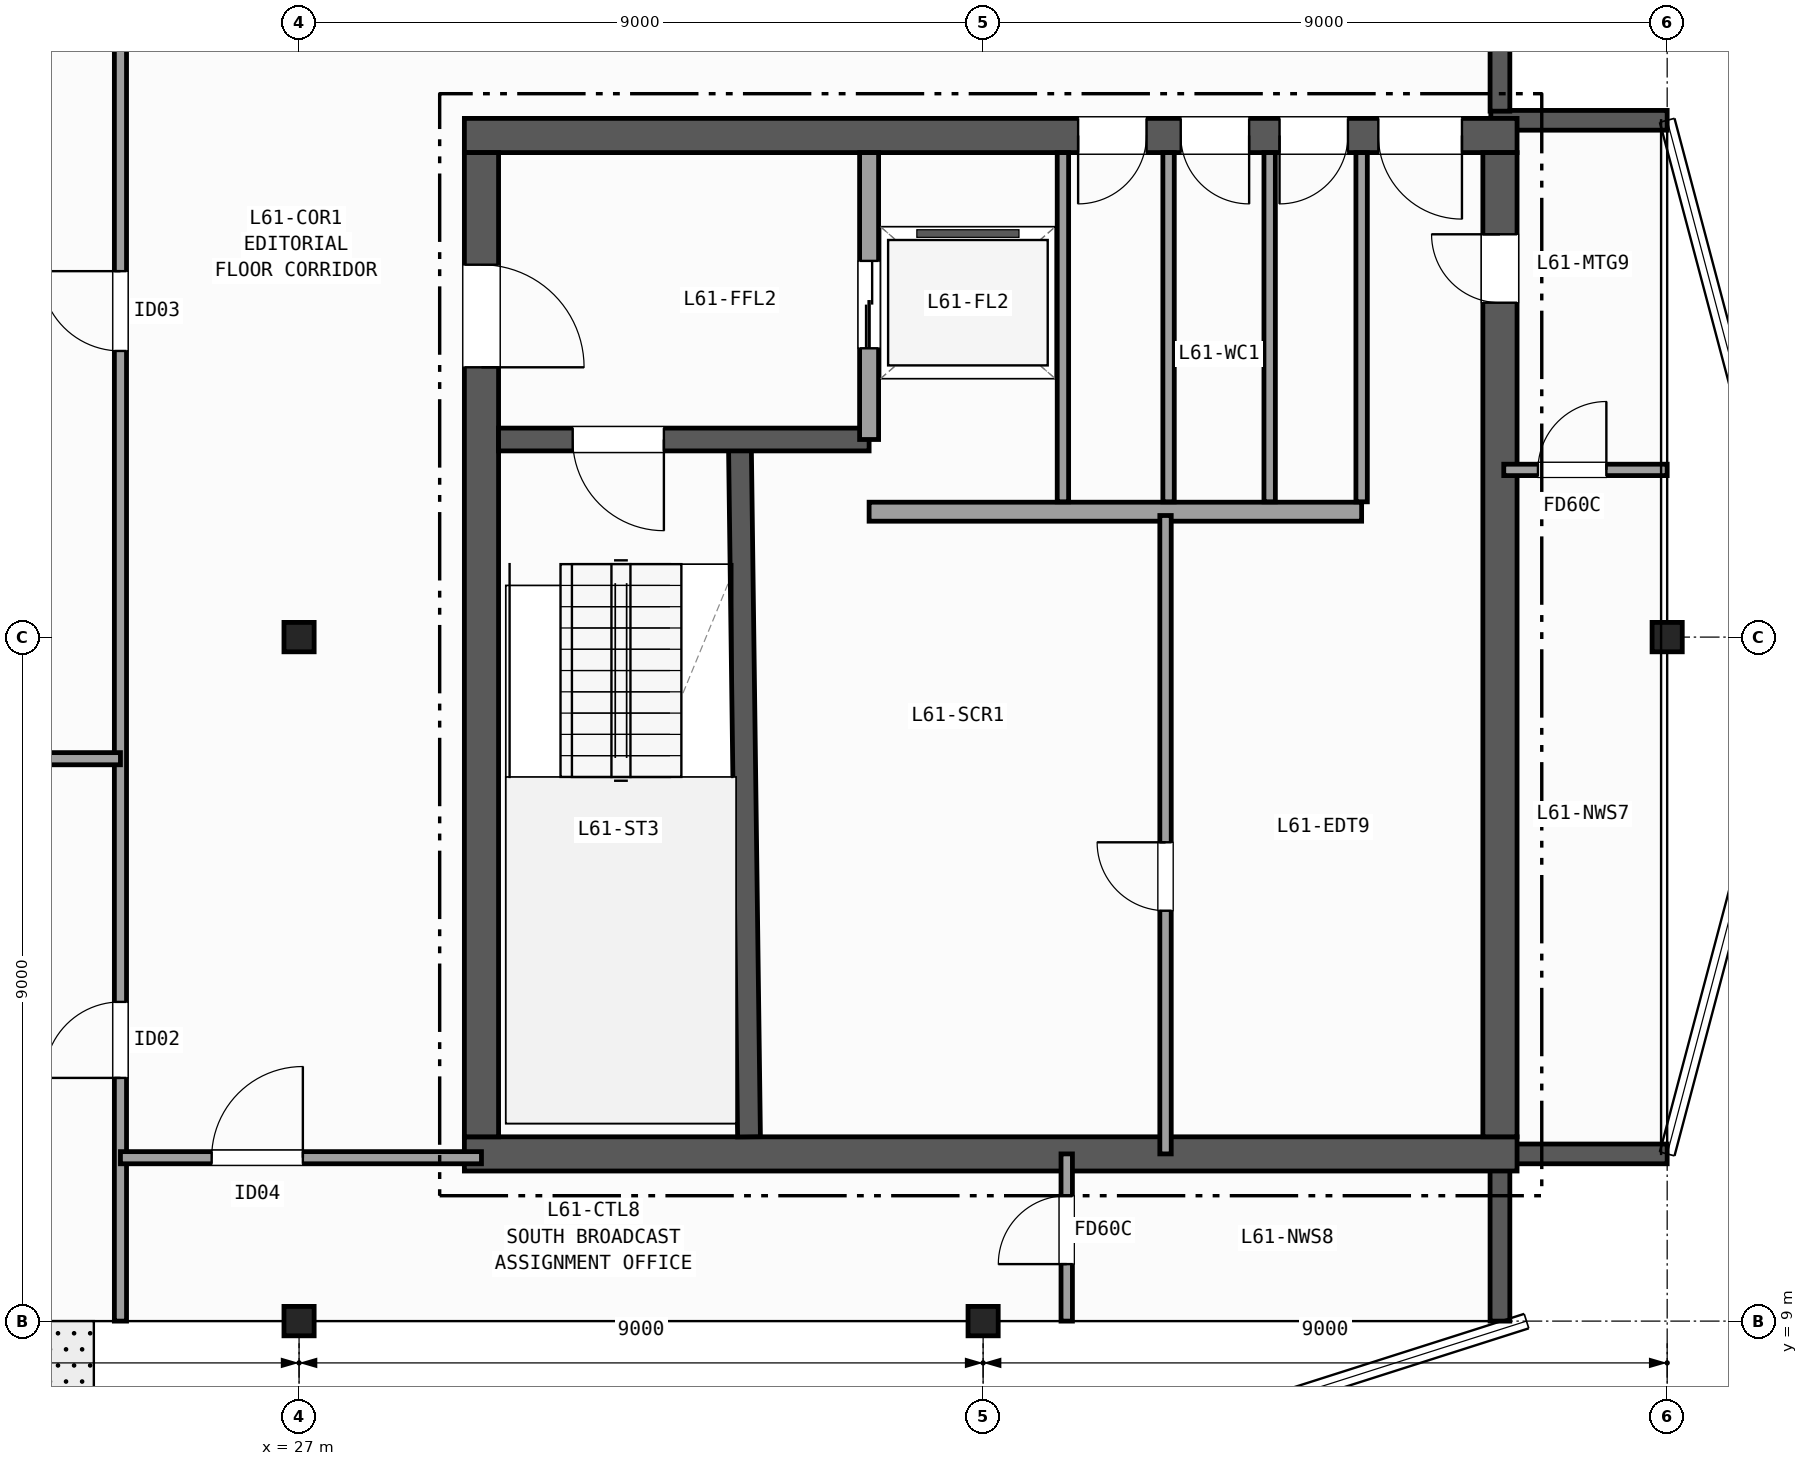
"""IFC4 building model, lengths in metres.
Left out: names, types, materials, properties, quantities, classifications, styles, units other than length and angle.
Written with IfcOpenShell. Run it as: python <this file> out.ifc"""

import sys

from ifc_helpers import new_model, si_unit, direction, frame, frame_2d, origin, origin_2d, place, context, subcontext, project, spatial, rectangle, i_section, extrude, element, fill, save


model = new_model("IFC4")
c1 = context("Model", 3, precision=1e-05, world=origin(), true_north=direction((0.0, 1.0)))
c2 = subcontext(c1, "Body", "Model", "MODEL_VIEW")
j1 = project(units=[si_unit("LENGTHUNIT", "METRE"), si_unit("PLANEANGLEUNIT", "RADIAN")], contexts=[c1])
p1 = place(None, origin())
s1 = spatial("IfcSite", under=j1, at=p1, CompositionType="ELEMENT")
p2 = place(p1, origin())
s2 = spatial("IfcBuilding", under=s1, at=p2, CompositionType="ELEMENT")
p3 = place(p2, frame((0.0, 0.0, 244.5)))
s3 = spatial("IfcBuildingStorey", under=s2, at=p3, CompositionType="ELEMENT", Elevation=244.5)
for number, where, z_axis, x_axis in (
    (1, (27.0, 9.0, 0.0), (0.0, 0.0, 1.0), (1.0, 0.0, 0.0)),
    (2, (27.0, 18.0, 0.0), (0.0, 0.0, 1.0), (1.0, 0.0, 0.0)),
    (3, (36.0, 9.0, 0.0), (0.0, 0.0, 1.0), (1.0, 0.0, 0.0)),
    (4, (45.0, 18.0, 0.0), (0.0, 0.0, 1.0), (1.0, 0.0, 0.0)),
):
    element("IfcColumn", number, at=place(p3, frame(where, z_axis=z_axis, x_axis=x_axis)), inside=s3, PredefinedType="COLUMN", context=c2, shape_type="SweptSolid", body=[
        extrude(i_section(OverallWidth=0.397, OverallDepth=0.387, WebThickness=0.021, FlangeThickness=0.033, FilletRadius=0.015, at=origin_2d()), origin(), (0.0, 0.0, 1.0), 3.7),
    ])
p4 = place(p3, frame((42.8, 9.0, 0.0), z_axis=(0.0, 0.0, 1.0), x_axis=(0.0, 1.0, 0.0)))
e5 = element("IfcWall", 5, at=p4, inside=s3, PredefinedType="SOLIDWALL", context=c2, shape_type="SweptSolid", body=[
    extrude(rectangle(XDim=2.08, YDim=0.26, at=frame_2d((1.04, 0.0))), origin(), (0.0, 0.0, 1.0), 3.42),
])
for number, where, z_axis, x_axis in (
    (6, (42.68, 11.2, 0.0), (0.0, 0.0, 1.0), (1.0, 0.0, 0.0)),
    (7, (45.0, 24.8, 0.0), (0.0, 0.0, 1.0), (-1.0, 0.0, 0.0)),
):
    element("IfcWall", number, at=place(p3, frame(where, z_axis=z_axis, x_axis=x_axis)), inside=s3, PredefinedType="SOLIDWALL", context=c2, shape_type="SweptSolid", body=[
        extrude(rectangle(XDim=2.32, YDim=0.26, at=frame_2d((1.16, 0.0))), origin(), (0.0, 0.0, 1.0), 3.42),
    ])
p5 = place(p3, frame((42.8, 24.92, 0.0), z_axis=(0.0, 0.0, 1.0), x_axis=(0.0, 1.0, 0.0)))
e8 = element("IfcWall", 8, at=p5, inside=s3, PredefinedType="SOLIDWALL", context=c2, shape_type="SweptSolid", body=[
    extrude(rectangle(XDim=2.08, YDim=0.26, at=frame_2d((1.04, 0.0))), origin(), (0.0, 0.0, 1.0), 3.42),
])
p6 = place(p3, frame((29.175, 11.2, 0.0), z_axis=(0.0, 0.0, 1.0), x_axis=(1.0, 0.0, 0.0)))
e9 = element("IfcWall", 9, at=p6, inside=s3, PredefinedType="SHEAR", context=c2, shape_type="SweptSolid", body=[
    extrude(rectangle(XDim=13.85, YDim=0.45, at=frame_2d((6.925, 0.0))), origin(), (0.0, 0.0, 1.0), 3.42),
])
p7 = place(p3, frame((43.025, 24.6, 0.0), z_axis=(0.0, 0.0, 1.0), x_axis=(-1.0, 0.0, 0.0)))
e10 = element("IfcWall", 10, at=p7, inside=s3, PredefinedType="SHEAR", context=c2, shape_type="SweptSolid", body=[
    extrude(rectangle(XDim=13.85, YDim=0.45, at=frame_2d((6.925, 0.0))), origin(), (0.0, 0.0, 1.0), 3.42),
])
p8 = place(p7, frame((0.725, 0.0, 0.0)))
e11 = element("IfcOpeningElement", 11, at=p8, cuts=e10, PredefinedType="OPENING", context=c2, shape_type="SweptSolid", body=[
    extrude(rectangle(XDim=1.1, YDim=2.15, at=frame_2d((0.55, 1.075))), frame((0.0, 0.235, 0.0), z_axis=(0.0, -1.0, 0.0), x_axis=(1.0, 0.0, 0.0)), (0.0, 0.0, 1.0), 0.47),
])
p9 = place(p7, frame((2.225, 0.0, 0.0)))
e12 = element("IfcOpeningElement", 12, at=p9, cuts=e10, PredefinedType="OPENING", context=c2, shape_type="SweptSolid", body=[
    extrude(rectangle(XDim=0.9, YDim=2.1, at=frame_2d((0.45, 1.05))), frame((0.0, 0.235, 0.0), z_axis=(0.0, -1.0, 0.0), x_axis=(1.0, 0.0, 0.0)), (0.0, 0.0, 1.0), 0.47),
])
p10 = place(p7, frame((3.525, 0.0, 0.0)))
e13 = element("IfcOpeningElement", 13, at=p10, cuts=e10, PredefinedType="OPENING", context=c2, shape_type="SweptSolid", body=[
    extrude(rectangle(XDim=0.9, YDim=2.1, at=frame_2d((0.45, 1.05))), frame((0.0, 0.235, 0.0), z_axis=(0.0, -1.0, 0.0), x_axis=(1.0, 0.0, 0.0)), (0.0, 0.0, 1.0), 0.47),
])
p11 = place(p7, frame((4.875, 0.0, 0.0)))
e14 = element("IfcOpeningElement", 14, at=p11, cuts=e10, PredefinedType="OPENING", context=c2, shape_type="SweptSolid", body=[
    extrude(rectangle(XDim=0.9, YDim=2.1, at=frame_2d((0.45, 1.05))), frame((0.0, 0.235, 0.0), z_axis=(0.0, -1.0, 0.0), x_axis=(1.0, 0.0, 0.0)), (0.0, 0.0, 1.0), 0.47),
])
p12 = place(p3, frame((29.4, 24.375, 0.0), z_axis=(0.0, 0.0, 1.0), x_axis=(0.0, -1.0, 0.0)))
e15 = element("IfcWall", 15, at=p12, inside=s3, PredefinedType="SHEAR", context=c2, shape_type="SweptSolid", body=[
    extrude(rectangle(XDim=12.95, YDim=0.45, at=frame_2d((6.475, 0.0))), origin(), (0.0, 0.0, 1.0), 3.42),
])
p13 = place(p12, frame((1.475, 0.0, 0.0)))
e16 = element("IfcOpeningElement", 16, at=p13, cuts=e15, PredefinedType="OPENING", context=c2, shape_type="SweptSolid", body=[
    extrude(rectangle(XDim=1.35, YDim=2.15, at=frame_2d((0.675, 1.075))), frame((0.0, 0.235, 0.0), z_axis=(0.0, -1.0, 0.0), x_axis=(1.0, 0.0, 0.0)), (0.0, 0.0, 1.0), 0.47),
])
p14 = place(p3, frame((42.8, 11.425, 0.0), z_axis=(0.0, 0.0, 1.0), x_axis=(0.0, 1.0, 0.0)))
e17 = element("IfcWall", 17, at=p14, inside=s3, PredefinedType="SHEAR", context=c2, shape_type="SweptSolid", body=[
    extrude(rectangle(XDim=12.95, YDim=0.45, at=frame_2d((6.475, 0.0))), origin(), (0.0, 0.0, 1.0), 3.42),
])
p15 = place(p14, frame((10.975, 0.0, 0.0)))
e18 = element("IfcOpeningElement", 18, at=p15, cuts=e17, PredefinedType="OPENING", context=c2, shape_type="SweptSolid", body=[
    extrude(rectangle(XDim=0.9, YDim=2.1, at=frame_2d((0.45, 1.05))), frame((0.0, 0.235, 0.0), z_axis=(0.0, -1.0, 0.0), x_axis=(1.0, 0.0, 0.0)), (0.0, 0.0, 1.0), 0.47),
])
p16 = place(p3, frame((32.92, 11.425, 0.0), z_axis=(0.0, 0.0, 1.0), x_axis=(-0.013135638869, 0.999913723774, 0.0)))
e19 = element("IfcWall", 19, at=p16, inside=s3, PredefinedType="SHEAR", context=c2, shape_type="SweptSolid", body=[
    extrude(rectangle(XDim=9.126, YDim=0.3, at=frame_2d((4.563, 0.0))), origin(), (0.0, 0.0, 1.0), 3.42),
])
p17 = place(p3, frame((34.5, 20.6, 0.0), z_axis=(0.0, 0.0, 1.0), x_axis=(-1.0, 0.0, 0.0)))
e20 = element("IfcWall", 20, at=p17, inside=s3, PredefinedType="SHEAR", context=c2, shape_type="SweptSolid", body=[
    extrude(rectangle(XDim=4.875, YDim=0.3, at=frame_2d((2.438, 0.0))), origin(), (0.0, 0.0, 1.0), 3.42),
])
p18 = place(p17, frame((2.7, 0.0, 0.0)))
e21 = element("IfcOpeningElement", 21, at=p18, cuts=e20, PredefinedType="OPENING", context=c2, shape_type="SweptSolid", body=[
    extrude(rectangle(XDim=1.2, YDim=2.15, at=frame_2d((0.6, 1.075))), frame((0.0, 0.16, 0.0), z_axis=(0.0, -1.0, 0.0), x_axis=(1.0, 0.0, 0.0)), (0.0, 0.0, 1.0), 0.32),
])
p19 = place(p3, frame((34.5, 20.6, 0.0), z_axis=(0.0, 0.0, 1.0), x_axis=(0.0, 1.0, 0.0)))
e22 = element("IfcWall", 22, at=p19, inside=s3, PredefinedType="PARTITIONING", context=c2, shape_type="SweptSolid", body=[
    extrude(rectangle(XDim=3.775, YDim=0.25, at=frame_2d((1.887, 0.0))), origin(), (0.0, 0.0, 1.0), 3.42),
])
p20 = place(p19, frame((1.2, 0.0, 0.0)))
e23 = element("IfcOpeningElement", 23, at=p20, cuts=e22, PredefinedType="OPENING", context=c2, shape_type="SweptSolid", body=[
    extrude(rectangle(XDim=1.15, YDim=2.15, at=frame_2d((0.575, 1.075))), frame((0.0, 0.135, 0.0), z_axis=(0.0, -1.0, 0.0), x_axis=(1.0, 0.0, 0.0)), (0.0, 0.0, 1.0), 0.27),
])
p21 = place(p3, frame((34.5, 19.65, 0.0), z_axis=(0.0, 0.0, 1.0), x_axis=(1.0, 0.0, 0.0)))
e24 = element("IfcWall", 24, at=p21, inside=s3, PredefinedType="PARTITIONING", context=c2, shape_type="SweptSolid", body=[
    extrude(rectangle(XDim=6.48, YDim=0.25, at=frame_2d((3.24, 0.0))), origin(), (0.0, 0.0, 1.0), 3.42),
])
p22 = place(p3, frame((38.4, 11.2, 0.0), z_axis=(0.0, 0.0, 1.0), x_axis=(0.0, 1.0, 0.0)))
e25 = element("IfcWall", 25, at=p22, inside=s3, PredefinedType="PARTITIONING", context=c2, shape_type="SweptSolid", body=[
    extrude(rectangle(XDim=8.4, YDim=0.15, at=frame_2d((4.2, 0.0))), origin(), (0.0, 0.0, 1.0), 3.42),
])
p23 = place(p22, frame((3.2, 0.0, 0.0)))
e26 = element("IfcOpeningElement", 26, at=p23, cuts=e25, PredefinedType="OPENING", context=c2, shape_type="SweptSolid", body=[
    extrude(rectangle(XDim=0.9, YDim=2.1, at=frame_2d((0.45, 1.05))), frame((0.0, 0.085, 0.0), z_axis=(0.0, -1.0, 0.0), x_axis=(1.0, 0.0, 0.0)), (0.0, 0.0, 1.0), 0.17),
])
for number, where, z_axis, x_axis in (
    (27, (37.05, 19.78, 0.0), (0.0, 0.0, 1.0), (0.0, 1.0, 0.0)),
    (28, (38.44, 19.78, 0.0), (0.0, 0.0, 1.0), (0.0, 1.0, 0.0)),
    (29, (39.77, 19.78, 0.0), (0.0, 0.0, 1.0), (0.0, 1.0, 0.0)),
    (30, (40.98, 19.78, 0.0), (0.0, 0.0, 1.0), (0.0, 1.0, 0.0)),
):
    element("IfcWall", number, at=place(p3, frame(where, z_axis=z_axis, x_axis=x_axis)), inside=s3, PredefinedType="PARTITIONING", context=c2, shape_type="SweptSolid", body=[
        extrude(rectangle(XDim=4.595, YDim=0.15, at=frame_2d((2.297, 0.0))), origin(), (0.0, 0.0, 1.0), 3.42),
    ])
p24 = place(p3, frame((24.65, 9.0, 0.0), z_axis=(0.0, 0.0, 1.0), x_axis=(0.0, 1.0, 0.0)))
e31 = element("IfcWall", 31, at=p24, inside=s3, PredefinedType="PARTITIONING", context=c2, shape_type="SweptSolid", body=[
    extrude(rectangle(XDim=19.2, YDim=0.16, at=frame_2d((9.6, 0.0))), origin(), (0.0, 0.0, 1.0), 2.707),
])
p25 = place(p24, frame((3.2, 0.0, 0.0)))
e32 = element("IfcOpeningElement", 32, at=p25, cuts=e31, PredefinedType="OPENING", context=c2, shape_type="SweptSolid", body=[
    extrude(rectangle(XDim=1.0, YDim=2.1, at=frame_2d((0.5, 1.05))), frame((0.0, 0.09, 0.0), z_axis=(0.0, -1.0, 0.0), x_axis=(1.0, 0.0, 0.0)), (0.0, 0.0, 1.0), 0.18),
])
p26 = place(p24, frame((12.765, 0.0, 0.0)))
e33 = element("IfcOpeningElement", 33, at=p26, cuts=e31, PredefinedType="OPENING", context=c2, shape_type="SweptSolid", body=[
    extrude(rectangle(XDim=1.05, YDim=2.15, at=frame_2d((0.525, 1.075))), frame((0.0, 0.09, 0.0), z_axis=(0.0, -1.0, 0.0), x_axis=(1.0, 0.0, 0.0)), (0.0, 0.0, 1.0), 0.18),
])
p27 = place(p3, frame((18.0, 16.4, 0.0), z_axis=(0.0, 0.0, 1.0), x_axis=(1.0, 0.0, 0.0)))
e34 = element("IfcWall", 34, at=p27, inside=s3, PredefinedType="PARTITIONING", context=c2, shape_type="SweptSolid", body=[
    extrude(rectangle(XDim=6.65, YDim=0.16, at=frame_2d((3.325, 0.0))), origin(), (0.0, 0.0, 1.0), 2.792),
])
p28 = place(p3, frame((24.65, 11.15, 0.0), z_axis=(0.0, 0.0, 1.0), x_axis=(1.0, 0.0, 0.0)))
e35 = element("IfcWall", 35, at=p28, inside=s3, PredefinedType="PARTITIONING", context=c2, shape_type="SweptSolid", body=[
    extrude(rectangle(XDim=4.75, YDim=0.16, at=frame_2d((2.375, 0.0))), origin(), (0.0, 0.0, 1.0), 2.792),
])
p29 = place(p28, frame((1.2, 0.0, 0.0)))
e36 = element("IfcOpeningElement", 36, at=p29, cuts=e35, PredefinedType="OPENING", context=c2, shape_type="SweptSolid", body=[
    extrude(rectangle(XDim=1.2, YDim=2.15, at=frame_2d((0.6, 1.075))), frame((0.0, 0.09, 0.0), z_axis=(0.0, -1.0, 0.0), x_axis=(1.0, 0.0, 0.0)), (0.0, 0.0, 1.0), 0.18),
])
p30 = place(p3, frame((37.1, 9.0, 0.0), z_axis=(0.0, 0.0, 1.0), x_axis=(0.0, 1.0, 0.0)))
e37 = element("IfcWall", 37, at=p30, inside=s3, PredefinedType="PARTITIONING", context=c2, shape_type="SweptSolid", body=[
    extrude(rectangle(XDim=2.2, YDim=0.15, at=frame_2d((1.1, 0.0))), origin(), (0.0, 0.0, 1.0), 3.42),
])
p31 = place(p30, frame((0.75, 0.0, 0.0)))
e38 = element("IfcOpeningElement", 38, at=p31, cuts=e37, PredefinedType="OPENING", context=c2, shape_type="SweptSolid", body=[
    extrude(rectangle(XDim=0.9, YDim=2.1, at=frame_2d((0.45, 1.05))), frame((0.0, 0.085, 0.0), z_axis=(0.0, -1.0, 0.0), x_axis=(1.0, 0.0, 0.0)), (0.0, 0.0, 1.0), 0.17),
])
p32 = place(p3, frame((42.85, 20.2, 0.0), z_axis=(0.0, 0.0, 1.0), x_axis=(1.0, 0.0, 0.0)))
e39 = element("IfcWall", 39, at=p32, inside=s3, PredefinedType="PARTITIONING", context=c2, shape_type="SweptSolid", body=[
    extrude(rectangle(XDim=2.15, YDim=0.15, at=frame_2d((1.075, 0.0))), origin(), (0.0, 0.0, 1.0), 3.42),
])
p33 = place(p32, frame((0.45, 0.0, 0.0)))
e40 = element("IfcOpeningElement", 40, at=p33, cuts=e39, PredefinedType="OPENING", context=c2, shape_type="SweptSolid", body=[
    extrude(rectangle(XDim=0.9, YDim=2.1, at=frame_2d((0.45, 1.05))), frame((0.0, 0.085, 0.0), z_axis=(0.0, -1.0, 0.0), x_axis=(1.0, 0.0, 0.0)), (0.0, 0.0, 1.0), 0.17),
])
p34 = place(p18, origin())
e41 = element("IfcDoor", 41, at=p34, inside=s3, OperationType="SINGLE_SWING_LEFT", PredefinedType="DOOR", context=c2, shape_type="SweptSolid", body=[
    extrude(rectangle(XDim=1.2, YDim=2.15, at=frame_2d((0.6, 1.075))), frame((0.0, 0.025, 0.0), z_axis=(0.0, -1.0, 0.0), x_axis=(1.0, 0.0, 0.0)), (0.0, 0.0, 1.0), 0.05),
])
fill(e21, e41)
p35 = place(p13, origin())
e42 = element("IfcDoor", 42, at=p35, inside=s3, OperationType="SINGLE_SWING_RIGHT", PredefinedType="DOOR", context=c2, shape_type="SweptSolid", body=[
    extrude(rectangle(XDim=1.35, YDim=2.15, at=frame_2d((0.675, 1.075))), frame((0.0, 0.025, 0.0), z_axis=(0.0, -1.0, 0.0), x_axis=(1.0, 0.0, 0.0)), (0.0, 0.0, 1.0), 0.05),
])
fill(e16, e42)
p36 = place(p15, origin())
e43 = element("IfcDoor", 43, at=p36, inside=s3, OperationType="SINGLE_SWING_RIGHT", PredefinedType="DOOR", context=c2, shape_type="SweptSolid", body=[
    extrude(rectangle(XDim=0.9, YDim=2.1, at=frame_2d((0.45, 1.05))), frame((0.0, 0.025, 0.0), z_axis=(0.0, -1.0, 0.0), x_axis=(1.0, 0.0, 0.0)), (0.0, 0.0, 1.0), 0.05),
])
fill(e18, e43)
p37 = place(p8, origin())
e44 = element("IfcDoor", 44, at=p37, inside=s3, OperationType="SINGLE_SWING_LEFT", PredefinedType="DOOR", context=c2, shape_type="SweptSolid", body=[
    extrude(rectangle(XDim=1.1, YDim=2.15, at=frame_2d((0.55, 1.075))), frame((0.0, 0.025, 0.0), z_axis=(0.0, -1.0, 0.0), x_axis=(1.0, 0.0, 0.0)), (0.0, 0.0, 1.0), 0.05),
])
fill(e11, e44)
p38 = place(p9, origin())
e45 = element("IfcDoor", 45, at=p38, inside=s3, OperationType="SINGLE_SWING_RIGHT", PredefinedType="DOOR", context=c2, shape_type="SweptSolid", body=[
    extrude(rectangle(XDim=0.9, YDim=2.1, at=frame_2d((0.45, 1.05))), frame((0.0, 0.025, 0.0), z_axis=(0.0, -1.0, 0.0), x_axis=(1.0, 0.0, 0.0)), (0.0, 0.0, 1.0), 0.05),
])
fill(e12, e45)
p39 = place(p10, origin())
e46 = element("IfcDoor", 46, at=p39, inside=s3, OperationType="SINGLE_SWING_LEFT", PredefinedType="DOOR", context=c2, shape_type="SweptSolid", body=[
    extrude(rectangle(XDim=0.9, YDim=2.1, at=frame_2d((0.45, 1.05))), frame((0.0, 0.025, 0.0), z_axis=(0.0, -1.0, 0.0), x_axis=(1.0, 0.0, 0.0)), (0.0, 0.0, 1.0), 0.05),
])
fill(e13, e46)
p40 = place(p11, origin())
e47 = element("IfcDoor", 47, at=p40, inside=s3, OperationType="SINGLE_SWING_RIGHT", PredefinedType="DOOR", context=c2, shape_type="SweptSolid", body=[
    extrude(rectangle(XDim=0.9, YDim=2.1, at=frame_2d((0.45, 1.05))), frame((0.0, 0.025, 0.0), z_axis=(0.0, -1.0, 0.0), x_axis=(1.0, 0.0, 0.0)), (0.0, 0.0, 1.0), 0.05),
])
fill(e14, e47)
p41 = place(p20, origin())
e48 = element("IfcDoor", 48, at=p41, inside=s3, OperationType="DOUBLE_DOOR_SLIDING", PredefinedType="DOOR", context=c2, shape_type="SweptSolid", body=[
    extrude(rectangle(XDim=1.15, YDim=2.15, at=frame_2d((0.575, 1.075))), frame((0.0, 0.025, 0.0), z_axis=(0.0, -1.0, 0.0), x_axis=(1.0, 0.0, 0.0)), (0.0, 0.0, 1.0), 0.05),
])
fill(e23, e48)
p42 = place(p23, origin())
e49 = element("IfcDoor", 49, at=p42, inside=s3, OperationType="SINGLE_SWING_RIGHT", PredefinedType="DOOR", context=c2, shape_type="SweptSolid", body=[
    extrude(rectangle(XDim=0.9, YDim=2.1, at=frame_2d((0.45, 1.05))), frame((0.0, 0.025, 0.0), z_axis=(0.0, -1.0, 0.0), x_axis=(1.0, 0.0, 0.0)), (0.0, 0.0, 1.0), 0.05),
])
fill(e26, e49)
p43 = place(p25, origin())
e50 = element("IfcDoor", 50, at=p43, inside=s3, OperationType="SINGLE_SWING_LEFT", PredefinedType="DOOR", context=c2, shape_type="SweptSolid", body=[
    extrude(rectangle(XDim=1.0, YDim=2.1, at=frame_2d((0.5, 1.05))), frame((0.0, 0.025, 0.0), z_axis=(0.0, -1.0, 0.0), x_axis=(1.0, 0.0, 0.0)), (0.0, 0.0, 1.0), 0.05),
])
fill(e32, e50)
p44 = place(p26, origin())
e51 = element("IfcDoor", 51, at=p44, inside=s3, OperationType="SINGLE_SWING_RIGHT", PredefinedType="DOOR", context=c2, shape_type="SweptSolid", body=[
    extrude(rectangle(XDim=1.05, YDim=2.15, at=frame_2d((0.525, 1.075))), frame((0.0, 0.025, 0.0), z_axis=(0.0, -1.0, 0.0), x_axis=(1.0, 0.0, 0.0)), (0.0, 0.0, 1.0), 0.05),
])
fill(e33, e51)
p45 = place(p29, origin())
e52 = element("IfcDoor", 52, at=p45, inside=s3, OperationType="SINGLE_SWING_RIGHT", PredefinedType="DOOR", context=c2, shape_type="SweptSolid", body=[
    extrude(rectangle(XDim=1.2, YDim=2.15, at=frame_2d((0.6, 1.075))), frame((0.0, 0.025, 0.0), z_axis=(0.0, -1.0, 0.0), x_axis=(1.0, 0.0, 0.0)), (0.0, 0.0, 1.0), 0.05),
])
fill(e36, e52)
p46 = place(p31, origin())
e53 = element("IfcDoor", 53, at=p46, inside=s3, OperationType="SINGLE_SWING_LEFT", PredefinedType="DOOR", context=c2, shape_type="SweptSolid", body=[
    extrude(rectangle(XDim=0.9, YDim=2.1, at=frame_2d((0.45, 1.05))), frame((0.0, 0.025, 0.0), z_axis=(0.0, -1.0, 0.0), x_axis=(1.0, 0.0, 0.0)), (0.0, 0.0, 1.0), 0.05),
])
fill(e38, e53)
p47 = place(p33, origin())
e54 = element("IfcDoor", 54, at=p47, inside=s3, OperationType="SINGLE_SWING_RIGHT", PredefinedType="DOOR", context=c2, shape_type="SweptSolid", body=[
    extrude(rectangle(XDim=0.9, YDim=2.1, at=frame_2d((0.45, 1.05))), frame((0.0, 0.025, 0.0), z_axis=(0.0, -1.0, 0.0), x_axis=(1.0, 0.0, 0.0)), (0.0, 0.0, 1.0), 0.05),
])
fill(e40, e54)
save(model, sys.argv[1])
